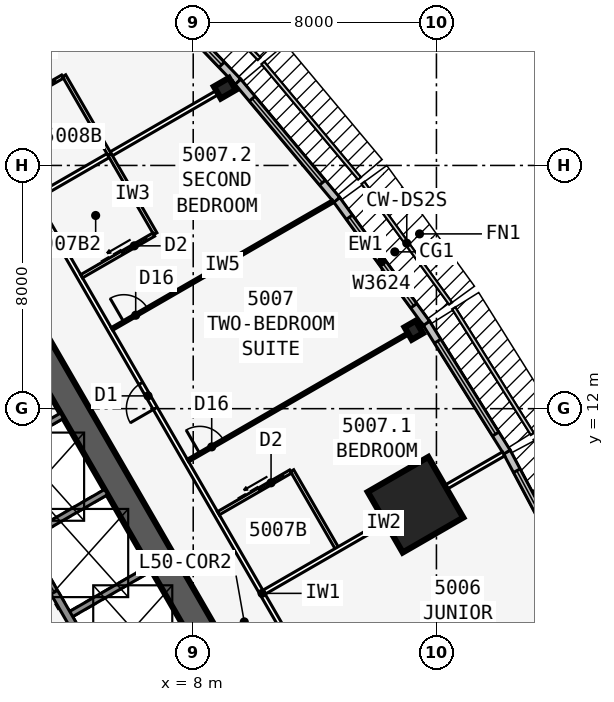
"""IFC4 building model, lengths in metres.
Left out: names, types, materials, properties, quantities, classifications, styles, units other than length and angle.
Written with IfcOpenShell. Run it as: python <this file> out.ifc"""

import sys

from ifc_helpers import new_model, si_unit, direction, frame, frame_2d, origin, origin_2d, place, context, subcontext, project, spatial, rectangle, i_section, extrude, element, fill, save


model = new_model("IFC4")
c1 = context("Model", 3, precision=1e-05, world=origin(), true_north=direction((0.0, 1.0)))
c2 = subcontext(c1, "Body", "Model", "MODEL_VIEW")
j1 = project(units=[si_unit("LENGTHUNIT", "METRE"), si_unit("PLANEANGLEUNIT", "RADIAN")], contexts=[c1])
p1 = place(None, origin())
s1 = spatial("IfcSite", under=j1, at=p1, CompositionType="ELEMENT")
p2 = place(p1, origin())
s2 = spatial("IfcBuilding", under=s1, at=p2, CompositionType="ELEMENT")
p3 = place(p2, frame((0.0, 0.0, 186.1)))
s3 = spatial("IfcBuildingStorey", under=s2, at=p3, CompositionType="ELEMENT", Elevation=186.1)
p4 = place(p3, frame((16.5, -9.526, 0.0), z_axis=(0.0, 0.0, 1.0), x_axis=(-0.499999749417, 0.866025548458, 0.0)))
e1 = element("IfcWall", 1, at=p4, inside=s3, PredefinedType="SHEAR", context=c2, shape_type="SweptSolid", body=[
    extrude(rectangle(XDim=33.0, YDim=0.9, at=frame_2d((16.5, 0.0))), origin(), (0.0, 0.0, 1.0), 3.4),
])
p5 = place(p4, frame((14.15, 0.0, 0.0)))
e2 = element("IfcOpeningElement", 2, at=p5, cuts=e1, PredefinedType="OPENING", context=c2, shape_type="SweptSolid", body=[
    extrude(rectangle(XDim=1.8, YDim=2.13, at=frame_2d((0.9, 1.065))), frame((0.0, 0.46, 0.0), z_axis=(0.0, -1.0, 0.0), x_axis=(1.0, 0.0, 0.0)), (0.0, 0.0, 1.0), 0.92),
])
p6 = place(p4, frame((12.6, 0.0, 0.0)))
e3 = element("IfcOpeningElement", 3, at=p6, cuts=e1, PredefinedType="OPENING", context=c2, shape_type="SweptSolid", body=[
    extrude(rectangle(XDim=1.0, YDim=2.13, at=frame_2d((0.5, 1.065))), frame((0.0, 0.46, 0.0), z_axis=(0.0, -1.0, 0.0), x_axis=(1.0, 0.0, 0.0)), (0.0, 0.0, 1.0), 0.92),
])
p7 = place(p3, frame((5.379, 2.586, 0.0), z_axis=(0.0, 0.0, 1.0), x_axis=(-0.500001375892, 0.866024609411, 0.0)))
e4 = element("IfcWall", 4, at=p7, inside=s3, PredefinedType="SOLIDWALL", context=c2, shape_type="SweptSolid", body=[
    extrude(rectangle(XDim=10.633, YDim=0.25, at=frame_2d((5.316, 0.0))), origin(), (0.0, 0.0, 1.0), 3.15),
])
p8 = place(p7, frame((9.164, 0.0, 0.0)))
e5 = element("IfcOpeningElement", 5, at=p8, cuts=e4, PredefinedType="OPENING", context=c2, shape_type="SweptSolid", body=[
    extrude(rectangle(XDim=0.9, YDim=2.13, at=frame_2d((0.45, 1.065))), frame((0.0, 0.135, 0.0), z_axis=(0.0, -1.0, 0.0), x_axis=(1.0, 0.0, 0.0)), (0.0, 0.0, 1.0), 0.27),
])
p9 = place(p7, frame((1.0, 0.0, 0.0)))
e6 = element("IfcOpeningElement", 6, at=p9, cuts=e4, PredefinedType="OPENING", context=c2, shape_type="SweptSolid", body=[
    extrude(rectangle(XDim=1.1, YDim=2.13, at=frame_2d((0.55, 1.065))), frame((0.0, 0.135, 0.0), z_axis=(0.0, -1.0, 0.0), x_axis=(1.0, 0.0, 0.0)), (0.0, 0.0, 1.0), 0.27),
])
p10 = place(p7, frame((3.9, 0.0, 0.0)))
e7 = element("IfcOpeningElement", 7, at=p10, cuts=e4, PredefinedType="OPENING", context=c2, shape_type="SweptSolid", body=[
    extrude(rectangle(XDim=1.1, YDim=2.13, at=frame_2d((0.55, 1.065))), frame((0.0, 0.135, 0.0), z_axis=(0.0, -1.0, 0.0), x_axis=(1.0, 0.0, 0.0)), (0.0, 0.0, 1.0), 0.27),
])
p11 = place(p7, frame((6.8, 0.0, 0.0)))
e8 = element("IfcOpeningElement", 8, at=p11, cuts=e4, PredefinedType="OPENING", context=c2, shape_type="SweptSolid", body=[
    extrude(rectangle(XDim=1.1, YDim=2.13, at=frame_2d((0.55, 1.065))), frame((0.0, 0.135, 0.0), z_axis=(0.0, -1.0, 0.0), x_axis=(1.0, 0.0, 0.0)), (0.0, 0.0, 1.0), 0.27),
])
for number, where, z_axis, x_axis in (
    (9, (3.879, 5.184, 0.0), (0.0, 0.0, 1.0), (0.866, 0.5, 0.0)),
    (10, (2.429, 7.696, 0.0), (0.0, 0.0, 1.0), (0.866, 0.5, 0.0)),
    (11, (0.979, 10.207, 0.0), (0.0, 0.0, 1.0), (0.866, 0.5, 0.0)),
):
    element("IfcWall", number, at=place(p3, frame(where, z_axis=z_axis, x_axis=x_axis)), inside=s3, PredefinedType="SOLIDWALL", context=c2, shape_type="SweptSolid", body=[
        extrude(rectangle(XDim=3.125, YDim=0.2, at=frame_2d((1.562, 0.0))), origin(), (0.0, 0.0, 1.0), 3.15),
    ])
p12 = place(p3, frame((15.254, 14.58, 0.0), z_axis=(0.0, 0.0, 1.0), x_axis=(0.866025403784, 0.5, 0.0)))
e12 = element("IfcColumn", 12, at=p12, inside=s3, PredefinedType="COLUMN", context=c2, shape_type="SweptSolid", body=[
    extrude(i_section(OverallWidth=0.424, OverallDepth=0.475, WebThickness=0.048, FlangeThickness=0.077, at=origin_2d()), origin(), (0.0, 0.0, 1.0), 3.4),
])
p13 = place(p3, frame((9.041, 22.541, 0.0), z_axis=(0.0, 0.0, 1.0), x_axis=(-0.5, 0.866025403784, 0.0)))
e13 = element("IfcColumn", 13, at=p13, inside=s3, PredefinedType="COLUMN", context=c2, shape_type="SweptSolid", body=[
    extrude(i_section(OverallWidth=0.455, OverallDepth=0.569, WebThickness=0.078, FlangeThickness=0.125, at=origin_2d()), origin(), (0.0, 0.0, 1.0), 3.4),
])
p14 = place(p3, frame((15.312, 8.84, 0.0), z_axis=(0.0, 0.0, 1.0), x_axis=(0.866025403784, 0.5, 0.0)))
e14 = element("IfcColumn", 14, at=p14, inside=s3, PredefinedType="COLUMN", context=c2, shape_type="SweptSolid", body=[
    extrude(rectangle(XDim=2.3, YDim=2.3, at=origin_2d()), origin(), (0.0, 0.0, 1.0), 3.4),
])
p15 = place(p3, frame((20.663, 6.161, 0.0), z_axis=(0.0, 0.0, 1.0), x_axis=(-0.469404966864, 0.882982999317, 0.0)))
e15 = element("IfcWall", 15, at=p15, inside=s3, PredefinedType="STANDARD", context=c2, shape_type="SweptSolid", body=[
    extrude(rectangle(XDim=5.003, YDim=0.25, at=frame_2d((2.501, 0.0))), origin(), (0.0, 0.0, 1.0), 3.15),
])
p16 = place(p15, frame((0.701, 0.0, 0.45)))
e16 = element("IfcOpeningElement", 16, at=p16, cuts=e15, PredefinedType="OPENING", context=c2, shape_type="SweptSolid", body=[
    extrude(rectangle(XDim=3.6, YDim=2.4, at=frame_2d((1.8, 1.2))), frame((0.0, 0.135, 0.0), z_axis=(0.0, -1.0, 0.0), x_axis=(1.0, 0.0, 0.0)), (0.0, 0.0, 1.0), 0.27),
])
p17 = place(p3, frame((18.319, 10.571, 0.0), z_axis=(0.0, 0.0, 1.0), x_axis=(-0.529990167382, 0.84800378683, 0.0)))
e17 = element("IfcWall", 17, at=p17, inside=s3, PredefinedType="STANDARD", context=c2, shape_type="SweptSolid", body=[
    extrude(rectangle(XDim=5.003, YDim=0.25, at=frame_2d((2.501, 0.0))), origin(), (0.0, 0.0, 1.0), 3.15),
])
p18 = place(p17, frame((0.701, 0.0, 0.45)))
e18 = element("IfcOpeningElement", 18, at=p18, cuts=e17, PredefinedType="OPENING", context=c2, shape_type="SweptSolid", body=[
    extrude(rectangle(XDim=3.6, YDim=2.4, at=frame_2d((1.8, 1.2))), frame((0.0, 0.135, 0.0), z_axis=(0.0, -1.0, 0.0), x_axis=(1.0, 0.0, 0.0)), (0.0, 0.0, 1.0), 0.27),
])
p19 = place(p3, frame((15.672, 14.807, 0.0), z_axis=(0.0, 0.0, 1.0), x_axis=(-0.587669188412, 0.809101307001, 0.0)))
e19 = element("IfcWall", 19, at=p19, inside=s3, PredefinedType="STANDARD", context=c2, shape_type="SweptSolid", body=[
    extrude(rectangle(XDim=5.028, YDim=0.25, at=frame_2d((2.514, 0.0))), origin(), (0.0, 0.0, 1.0), 3.15),
])
p20 = place(p19, frame((0.714, 0.0, 0.45)))
e20 = element("IfcOpeningElement", 20, at=p20, cuts=e19, PredefinedType="OPENING", context=c2, shape_type="SweptSolid", body=[
    extrude(rectangle(XDim=3.6, YDim=2.4, at=frame_2d((1.8, 1.2))), frame((0.0, 0.135, 0.0), z_axis=(0.0, -1.0, 0.0), x_axis=(1.0, 0.0, 0.0)), (0.0, 0.0, 1.0), 0.27),
])
p21 = place(p3, frame((12.723, 18.868, 0.0), z_axis=(0.0, 0.0, 1.0), x_axis=(-0.641810386606, 0.766863369607, 0.0)))
e21 = element("IfcWall", 21, at=p21, inside=s3, PredefinedType="STANDARD", context=c2, shape_type="SweptSolid", body=[
    extrude(rectangle(XDim=5.076, YDim=0.25, at=frame_2d((2.538, 0.0))), origin(), (0.0, 0.0, 1.0), 3.15),
])
p22 = place(p21, frame((0.738, 0.0, 0.45)))
e22 = element("IfcOpeningElement", 22, at=p22, cuts=e21, PredefinedType="OPENING", context=c2, shape_type="SweptSolid", body=[
    extrude(rectangle(XDim=3.6, YDim=2.4, at=frame_2d((1.8, 1.2))), frame((0.0, 0.135, 0.0), z_axis=(0.0, -1.0, 0.0), x_axis=(1.0, 0.0, 0.0)), (0.0, 0.0, 1.0), 0.27),
])
p23 = place(p3, frame((9.471, 22.754, 0.0), z_axis=(0.0, 0.0, 1.0), x_axis=(-0.691719937936, 0.722165858693, 0.0)))
e23 = element("IfcWall", 23, at=p23, inside=s3, PredefinedType="STANDARD", context=c2, shape_type="SweptSolid", body=[
    extrude(rectangle(XDim=5.148, YDim=0.25, at=frame_2d((2.574, 0.0))), origin(), (0.0, 0.0, 1.0), 3.15),
])
p24 = place(p23, frame((0.774, 0.0, 0.45)))
e24 = element("IfcOpeningElement", 24, at=p24, cuts=e23, PredefinedType="OPENING", context=c2, shape_type="SweptSolid", body=[
    extrude(rectangle(XDim=3.6, YDim=2.4, at=frame_2d((1.8, 1.2))), frame((0.0, 0.135, 0.0), z_axis=(0.0, -1.0, 0.0), x_axis=(1.0, 0.0, 0.0)), (0.0, 0.0, 1.0), 0.27),
])
p25 = place(p3, frame((20.027, -10.985, 0.0), z_axis=(0.0, 0.0, 1.0), x_axis=(-0.500001677587, 0.866024435227, 0.0)))
e25 = element("IfcWall", 25, at=p25, inside=s3, PredefinedType="PARTITIONING", context=c2, shape_type="SweptSolid", body=[
    extrude(rectangle(XDim=39.054, YDim=0.15, at=frame_2d((19.527, 0.0))), origin(), (0.0, 0.0, 1.0), 3.15),
])
p26 = place(p25, frame((1.558, 0.0, 0.0)))
e26 = element("IfcOpeningElement", 26, at=p26, cuts=e25, PredefinedType="OPENING", context=c2, shape_type="SweptSolid", body=[
    extrude(rectangle(XDim=0.95, YDim=2.13, at=frame_2d((0.475, 1.065))), frame((0.0, 0.085, 0.0), z_axis=(0.0, -1.0, 0.0), x_axis=(1.0, 0.0, 0.0)), (0.0, 0.0, 1.0), 0.17),
])
p27 = place(p25, frame((12.752, 0.0, 0.0)))
e27 = element("IfcOpeningElement", 27, at=p27, cuts=e25, PredefinedType="OPENING", context=c2, shape_type="SweptSolid", body=[
    extrude(rectangle(XDim=0.95, YDim=2.13, at=frame_2d((0.475, 1.065))), frame((0.0, 0.085, 0.0), z_axis=(0.0, -1.0, 0.0), x_axis=(1.0, 0.0, 0.0)), (0.0, 0.0, 1.0), 0.17),
])
p28 = place(p25, frame((26.552, 0.0, 0.0)))
e28 = element("IfcOpeningElement", 28, at=p28, cuts=e25, PredefinedType="OPENING", context=c2, shape_type="SweptSolid", body=[
    extrude(rectangle(XDim=0.95, YDim=2.13, at=frame_2d((0.475, 1.065))), frame((0.0, 0.085, 0.0), z_axis=(0.0, -1.0, 0.0), x_axis=(1.0, 0.0, 0.0)), (0.0, 0.0, 1.0), 0.17),
])
p29 = place(p25, frame((37.752, 0.0, 0.0)))
e29 = element("IfcOpeningElement", 29, at=p29, cuts=e25, PredefinedType="OPENING", context=c2, shape_type="SweptSolid", body=[
    extrude(rectangle(XDim=0.95, YDim=2.13, at=frame_2d((0.475, 1.065))), frame((0.0, 0.085, 0.0), z_axis=(0.0, -1.0, 0.0), x_axis=(1.0, 0.0, 0.0)), (0.0, 0.0, 1.0), 0.17),
])
p30 = place(p3, frame((10.329, 5.963, 0.0), z_axis=(0.0, 0.0, 1.0), x_axis=(0.866025170687, 0.500000403736, 0.0)))
e30 = element("IfcWall", 30, at=p30, inside=s3, PredefinedType="PARTITIONING", context=c2, shape_type="SweptSolid", body=[
    extrude(rectangle(XDim=9.099, YDim=0.15, at=frame_2d((4.549, 0.0))), origin(), (0.0, 0.0, 1.0), 2.108),
])
p31 = place(p3, frame((7.829, 10.293, 0.0), z_axis=(0.0, 0.0, 1.0), x_axis=(0.866027015393, 0.499997208602, 0.0)))
e31 = element("IfcWall", 31, at=p31, inside=s3, PredefinedType="PARTITIONING", context=c2, shape_type="SweptSolid", body=[
    extrude(rectangle(XDim=8.922, YDim=0.1, at=frame_2d((4.461, 0.0))), origin(), (0.0, 0.0, 1.0), 2.05),
])
p32 = place(p31, frame((0.45, 0.0, 0.0)))
e32 = element("IfcOpeningElement", 32, at=p32, cuts=e31, PredefinedType="OPENING", context=c2, shape_type="SweptSolid", body=[
    extrude(rectangle(XDim=0.9, YDim=2.032, at=frame_2d((0.45, 1.016))), frame((0.0, 0.06, 0.0), z_axis=(0.0, -1.0, 0.0), x_axis=(1.0, 0.0, 0.0)), (0.0, 0.0, 1.0), 0.12),
])
p33 = place(p3, frame((5.329, 14.623, 0.0), z_axis=(0.0, 0.0, 1.0), x_axis=(0.866011723728, 0.500023693804, 0.0)))
e33 = element("IfcWall", 33, at=p33, inside=s3, PredefinedType="PARTITIONING", context=c2, shape_type="SweptSolid", body=[
    extrude(rectangle(XDim=8.395, YDim=0.1, at=frame_2d((4.198, 0.0))), origin(), (0.0, 0.0, 1.0), 2.108),
])
p34 = place(p33, frame((0.45, 0.0, 0.0)))
e34 = element("IfcOpeningElement", 34, at=p34, cuts=e33, PredefinedType="OPENING", context=c2, shape_type="SweptSolid", body=[
    extrude(rectangle(XDim=0.9, YDim=2.032, at=frame_2d((0.45, 1.016))), frame((0.0, 0.06, 0.0), z_axis=(0.0, -1.0, 0.0), x_axis=(1.0, 0.0, 0.0)), (0.0, 0.0, 1.0), 0.12),
])
p35 = place(p3, frame((2.829, 18.954, 0.0), z_axis=(0.0, 0.0, 1.0), x_axis=(0.866015739374, 0.500016738876, 0.0)))
e35 = element("IfcWall", 35, at=p35, inside=s3, PredefinedType="PARTITIONING", context=c2, shape_type="SweptSolid", body=[
    extrude(rectangle(XDim=7.516, YDim=0.15, at=frame_2d((3.758, 0.0))), origin(), (0.0, 0.0, 1.0), 2.05),
])
p36 = place(p3, frame((12.753, 7.363, 0.0), z_axis=(0.0, 0.0, 1.0), x_axis=(-0.499990139034, 0.866031096941, 0.0)))
e36 = element("IfcWall", 36, at=p36, inside=s3, PredefinedType="PLUMBINGWALL", context=c2, shape_type="SweptSolid", body=[
    extrude(rectangle(XDim=3.0, YDim=0.12, at=frame_2d((1.5, 0.0))), origin(), (0.0, 0.0, 1.0), 3.15),
])
p37 = place(p3, frame((8.829, 8.561, 0.0), z_axis=(0.0, 0.0, 1.0), x_axis=(0.866035715982, 0.499982138324, 0.0)))
e37 = element("IfcWall", 37, at=p37, inside=s3, PredefinedType="PLUMBINGWALL", context=c2, shape_type="SweptSolid", body=[
    extrude(rectangle(XDim=2.74, YDim=0.12, at=frame_2d((1.37, 0.0))), origin(), (0.0, 0.0, 1.0), 3.15),
])
p38 = place(p37, frame((1.55, 0.0, 0.0)))
e38 = element("IfcOpeningElement", 38, at=p38, cuts=e37, PredefinedType="OPENING", context=c2, shape_type="SweptSolid", body=[
    extrude(rectangle(XDim=0.9, YDim=2.13, at=frame_2d((0.45, 1.065))), frame((0.0, 0.07, 0.0), z_axis=(0.0, -1.0, 0.0), x_axis=(1.0, 0.0, 0.0)), (0.0, 0.0, 1.0), 0.14),
])
p39 = place(p3, frame((6.753, 17.755, 0.0), z_axis=(0.0, 0.0, 1.0), x_axis=(-0.499990139034, 0.866031096941, 0.0)))
e39 = element("IfcWall", 39, at=p39, inside=s3, PredefinedType="PLUMBINGWALL", context=c2, shape_type="SweptSolid", body=[
    extrude(rectangle(XDim=3.0, YDim=0.12, at=frame_2d((1.5, 0.0))), origin(), (0.0, 0.0, 1.0), 3.15),
])
p40 = place(p3, frame((4.329, 16.355, 0.0), z_axis=(0.0, 0.0, 1.0), x_axis=(0.866035715982, 0.499982138324, 0.0)))
e40 = element("IfcWall", 40, at=p40, inside=s3, PredefinedType="PLUMBINGWALL", context=c2, shape_type="SweptSolid", body=[
    extrude(rectangle(XDim=2.74, YDim=0.12, at=frame_2d((1.37, 0.0))), origin(), (0.0, 0.0, 1.0), 3.15),
])
p41 = place(p40, frame((1.55, 0.0, 0.0)))
e41 = element("IfcOpeningElement", 41, at=p41, cuts=e40, PredefinedType="OPENING", context=c2, shape_type="SweptSolid", body=[
    extrude(rectangle(XDim=0.9, YDim=2.13, at=frame_2d((0.45, 1.065))), frame((0.0, 0.07, 0.0), z_axis=(0.0, -1.0, 0.0), x_axis=(1.0, 0.0, 0.0)), (0.0, 0.0, 1.0), 0.14),
])
p42 = place(p3, frame((5.253, 20.354, 0.0), z_axis=(0.0, 0.0, 1.0), x_axis=(-0.499990139034, 0.866031096941, 0.0)))
e42 = element("IfcWall", 42, at=p42, inside=s3, PredefinedType="PLUMBINGWALL", context=c2, shape_type="SweptSolid", body=[
    extrude(rectangle(XDim=3.0, YDim=0.12, at=frame_2d((1.5, 0.0))), origin(), (0.0, 0.0, 1.0), 3.15),
])
p43 = place(p3, frame((1.329, 21.552, 0.0), z_axis=(0.0, 0.0, 1.0), x_axis=(0.865997131366, 0.500048966069, 0.0)))
e43 = element("IfcWall", 43, at=p43, inside=s3, PredefinedType="PLUMBINGWALL", context=c2, shape_type="SweptSolid", body=[
    extrude(rectangle(XDim=2.74, YDim=0.12, at=frame_2d((1.37, 0.0))), origin(), (0.0, 0.0, 1.0), 3.15),
])
p44 = place(p43, frame((1.55, 0.0, 0.0)))
e44 = element("IfcOpeningElement", 44, at=p44, cuts=e43, PredefinedType="OPENING", context=c2, shape_type="SweptSolid", body=[
    extrude(rectangle(XDim=0.9, YDim=2.13, at=frame_2d((0.45, 1.065))), frame((0.0, 0.07, 0.0), z_axis=(0.0, -1.0, 0.0), x_axis=(1.0, 0.0, 0.0)), (0.0, 0.0, 1.0), 0.14),
])
p45 = place(p16, origin())
e45 = element("IfcWindow", 45, at=p45, inside=s3, PartitioningType="SINGLE_PANEL", PredefinedType="WINDOW", context=c2, shape_type="SweptSolid", body=[
    extrude(rectangle(XDim=3.6, YDim=2.4, at=frame_2d((1.8, 1.2))), frame((0.0, 0.03, 0.0), z_axis=(0.0, -1.0, 0.0), x_axis=(1.0, 0.0, 0.0)), (0.0, 0.0, 1.0), 0.06),
])
fill(e16, e45)
p46 = place(p18, origin())
e46 = element("IfcWindow", 46, at=p46, inside=s3, PartitioningType="SINGLE_PANEL", PredefinedType="WINDOW", context=c2, shape_type="SweptSolid", body=[
    extrude(rectangle(XDim=3.6, YDim=2.4, at=frame_2d((1.8, 1.2))), frame((0.0, 0.03, 0.0), z_axis=(0.0, -1.0, 0.0), x_axis=(1.0, 0.0, 0.0)), (0.0, 0.0, 1.0), 0.06),
])
fill(e18, e46)
p47 = place(p20, origin())
e47 = element("IfcWindow", 47, at=p47, inside=s3, PartitioningType="SINGLE_PANEL", PredefinedType="WINDOW", context=c2, shape_type="SweptSolid", body=[
    extrude(rectangle(XDim=3.6, YDim=2.4, at=frame_2d((1.8, 1.2))), frame((0.0, 0.03, 0.0), z_axis=(0.0, -1.0, 0.0), x_axis=(1.0, 0.0, 0.0)), (0.0, 0.0, 1.0), 0.06),
])
fill(e20, e47)
p48 = place(p22, origin())
e48 = element("IfcWindow", 48, at=p48, inside=s3, PartitioningType="SINGLE_PANEL", PredefinedType="WINDOW", context=c2, shape_type="SweptSolid", body=[
    extrude(rectangle(XDim=3.6, YDim=2.4, at=frame_2d((1.8, 1.2))), frame((0.0, 0.03, 0.0), z_axis=(0.0, -1.0, 0.0), x_axis=(1.0, 0.0, 0.0)), (0.0, 0.0, 1.0), 0.06),
])
fill(e22, e48)
p49 = place(p24, origin())
e49 = element("IfcWindow", 49, at=p49, inside=s3, PartitioningType="SINGLE_PANEL", PredefinedType="WINDOW", context=c2, shape_type="SweptSolid", body=[
    extrude(rectangle(XDim=3.6, YDim=2.4, at=frame_2d((1.8, 1.2))), frame((0.0, 0.03, 0.0), z_axis=(0.0, -1.0, 0.0), x_axis=(1.0, 0.0, 0.0)), (0.0, 0.0, 1.0), 0.06),
])
fill(e24, e49)
p50 = place(p32, origin())
e50 = element("IfcDoor", 50, at=p50, inside=s3, OperationType="SINGLE_SWING_LEFT", PredefinedType="DOOR", context=c2, shape_type="SweptSolid", body=[
    extrude(rectangle(XDim=0.9, YDim=2.032, at=frame_2d((0.45, 1.016))), frame((0.0, 0.025, 0.0), z_axis=(0.0, -1.0, 0.0), x_axis=(1.0, 0.0, 0.0)), (0.0, 0.0, 1.0), 0.05),
])
fill(e32, e50)
p51 = place(p34, origin())
e51 = element("IfcDoor", 51, at=p51, inside=s3, OperationType="SINGLE_SWING_LEFT", PredefinedType="DOOR", context=c2, shape_type="SweptSolid", body=[
    extrude(rectangle(XDim=0.9, YDim=2.032, at=frame_2d((0.45, 1.016))), frame((0.0, 0.025, 0.0), z_axis=(0.0, -1.0, 0.0), x_axis=(1.0, 0.0, 0.0)), (0.0, 0.0, 1.0), 0.05),
])
fill(e34, e51)
p52 = place(p38, origin())
e52 = element("IfcDoor", 52, at=p52, inside=s3, OperationType="SLIDING_TO_LEFT", PredefinedType="DOOR", context=c2, shape_type="SweptSolid", body=[
    extrude(rectangle(XDim=0.9, YDim=2.13, at=frame_2d((0.45, 1.065))), frame((0.0, 0.025, 0.0), z_axis=(0.0, -1.0, 0.0), x_axis=(1.0, 0.0, 0.0)), (0.0, 0.0, 1.0), 0.05),
])
fill(e38, e52)
p53 = place(p28, origin())
e53 = element("IfcDoor", 53, at=p53, inside=s3, OperationType="SINGLE_SWING_LEFT", PredefinedType="DOOR", context=c2, shape_type="SweptSolid", body=[
    extrude(rectangle(XDim=0.95, YDim=2.13, at=frame_2d((0.475, 1.065))), frame((0.0, 0.025, 0.0), z_axis=(0.0, -1.0, 0.0), x_axis=(1.0, 0.0, 0.0)), (0.0, 0.0, 1.0), 0.05),
])
fill(e28, e53)
p54 = place(p41, origin())
e54 = element("IfcDoor", 54, at=p54, inside=s3, OperationType="SLIDING_TO_LEFT", PredefinedType="DOOR", context=c2, shape_type="SweptSolid", body=[
    extrude(rectangle(XDim=0.9, YDim=2.13, at=frame_2d((0.45, 1.065))), frame((0.0, 0.025, 0.0), z_axis=(0.0, -1.0, 0.0), x_axis=(1.0, 0.0, 0.0)), (0.0, 0.0, 1.0), 0.05),
])
fill(e41, e54)
p55 = place(p44, origin())
e55 = element("IfcDoor", 55, at=p55, inside=s3, OperationType="SLIDING_TO_LEFT", PredefinedType="DOOR", context=c2, shape_type="SweptSolid", body=[
    extrude(rectangle(XDim=0.9, YDim=2.13, at=frame_2d((0.45, 1.065))), frame((0.0, 0.025, 0.0), z_axis=(0.0, -1.0, 0.0), x_axis=(1.0, 0.0, 0.0)), (0.0, 0.0, 1.0), 0.05),
])
fill(e44, e55)
p56 = place(p10, origin())
e56 = element("IfcDoor", 56, at=p56, inside=s3, OperationType="DOUBLE_DOOR_SLIDING", PredefinedType="USERDEFINED", context=c2, shape_type="SweptSolid", body=[
    extrude(rectangle(XDim=1.1, YDim=2.13, at=frame_2d((0.55, 1.065))), frame((0.0, 0.025, 0.0), z_axis=(0.0, -1.0, 0.0), x_axis=(1.0, 0.0, 0.0)), (0.0, 0.0, 1.0), 0.05),
])
fill(e7, e56)
save(model, sys.argv[1])
